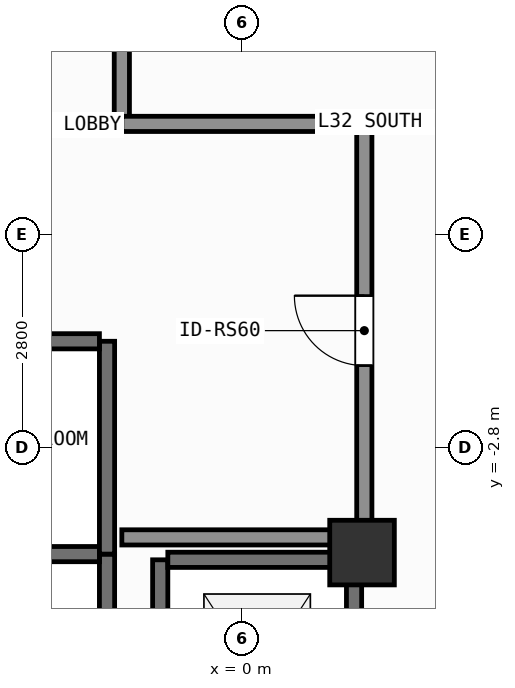
"""IFC4 building model, lengths in metres.
Left out: names, types, materials, properties, quantities, classifications, styles, units other than length and angle.
Written with IfcOpenShell. Run it as: python <this file> out.ifc"""

import sys

from ifc_helpers import new_model, si_unit, direction, frame, frame_2d, origin, origin_2d, place, context, subcontext, project, spatial, rectangle, extrude, element, fill, save


model = new_model("IFC4")
c1 = context("Model", 3, precision=1e-05, world=origin(), true_north=direction((0.0, 1.0)))
c2 = subcontext(c1, "Body", "Model", "MODEL_VIEW")
j1 = project(units=[si_unit("LENGTHUNIT", "METRE"), si_unit("PLANEANGLEUNIT", "RADIAN")], contexts=[c1])
p1 = place(None, origin())
s1 = spatial("IfcSite", under=j1, at=p1, CompositionType="ELEMENT")
p2 = place(p1, origin())
s2 = spatial("IfcBuilding", under=s1, at=p2, CompositionType="ELEMENT")
p3 = place(p2, frame((0.0, 0.0, 129.0)))
s3 = spatial("IfcBuildingStorey", under=s2, at=p3, CompositionType="ELEMENT", Elevation=129.0)
p4 = place(p3, frame((1.58, -4.18, 0.0), z_axis=(0.0, 0.0, 1.0), x_axis=(1.0, 0.0, 0.0)))
e1 = element("IfcColumn", 1, at=p4, inside=s3, PredefinedType="COLUMN", context=c2, shape_type="SweptSolid", body=[
    extrude(rectangle(XDim=0.85, YDim=0.85, at=origin_2d()), origin(), (0.0, 0.0, 1.0), 3.9),
])
p5 = place(p3, frame((-1.775, -7.0, 0.0), z_axis=(0.0, 0.0, 1.0), x_axis=(0.0, 1.0, 0.0)))
e2 = element("IfcWall", 2, at=p5, inside=s3, PredefinedType="SHEAR", context=c2, shape_type="SweptSolid", body=[
    extrude(rectangle(XDim=2.8, YDim=0.2, at=frame_2d((1.4, 0.0))), origin(), (0.0, 0.0, 1.0), 3.68),
])
p6 = place(p3, frame((-4.325, -4.2, 0.0), z_axis=(0.0, 0.0, 1.0), x_axis=(1.0, 0.0, 0.0)))
e3 = element("IfcWall", 3, at=p6, inside=s3, PredefinedType="SHEAR", context=c2, shape_type="SweptSolid", body=[
    extrude(rectangle(XDim=2.45, YDim=0.2, at=frame_2d((1.225, 0.0))), origin(), (0.0, 0.0, 1.0), 3.68),
])
p7 = place(p3, frame((-1.775, -4.2, 0.0), z_axis=(0.0, 0.0, 1.0), x_axis=(0.0, 1.0, 0.0)))
e4 = element("IfcWall", 4, at=p7, inside=s3, PredefinedType="SHEAR", context=c2, shape_type="SweptSolid", body=[
    extrude(rectangle(XDim=2.8, YDim=0.2, at=frame_2d((1.4, 0.0))), origin(), (0.0, 0.0, 1.0), 3.68),
])
p8 = place(p3, frame((-4.325, -1.4, 0.0), z_axis=(0.0, 0.0, 1.0), x_axis=(1.0, 0.0, 0.0)))
e5 = element("IfcWall", 5, at=p8, inside=s3, PredefinedType="SHEAR", context=c2, shape_type="SweptSolid", body=[
    extrude(rectangle(XDim=2.45, YDim=0.2, at=frame_2d((1.225, 0.0))), origin(), (0.0, 0.0, 1.0), 3.68),
])
p9 = place(p3, frame((-1.075, -7.925, 0.0), z_axis=(0.0, 0.0, 1.0), x_axis=(0.0, 1.0, 0.0)))
e6 = element("IfcWall", 6, at=p9, inside=s3, PredefinedType="SHEAR", context=c2, shape_type="SweptSolid", body=[
    extrude(rectangle(XDim=3.65, YDim=0.2, at=frame_2d((1.825, 0.0))), origin(), (0.0, 0.0, 1.0), 3.68),
])
p10 = place(p3, frame((1.475, -7.925, 0.0), z_axis=(0.0, 0.0, 1.0), x_axis=(0.0, 1.0, 0.0)))
e7 = element("IfcWall", 7, at=p10, inside=s3, PredefinedType="SHEAR", context=c2, shape_type="SweptSolid", body=[
    extrude(rectangle(XDim=3.65, YDim=0.2, at=frame_2d((1.825, 0.0))), origin(), (0.0, 0.0, 1.0), 3.68),
])
p11 = place(p10, frame((1.575, 0.0, 0.0)))
e8 = element("IfcOpeningElement", 8, at=p11, cuts=e7, PredefinedType="OPENING", context=c2, shape_type="SweptSolid", body=[
    extrude(rectangle(XDim=1.1, YDim=2.2, at=frame_2d((0.55, 1.1))), frame((0.0, 0.11, 0.0), z_axis=(0.0, -1.0, 0.0), x_axis=(1.0, 0.0, 0.0)), (0.0, 0.0, 1.0), 0.22),
])
p12 = place(p3, frame((-0.975, -4.275, 0.0), z_axis=(0.0, 0.0, 1.0), x_axis=(1.0, 0.0, 0.0)))
e9 = element("IfcWall", 9, at=p12, inside=s3, PredefinedType="SHEAR", context=c2, shape_type="SweptSolid", body=[
    extrude(rectangle(XDim=2.35, YDim=0.2, at=frame_2d((1.175, 0.0))), origin(), (0.0, 0.0, 1.0), 3.68),
])
p13 = place(p3, frame((1.61, -3.98, 0.0), z_axis=(0.0, 0.0, 1.0), x_axis=(0.0, 1.0, 0.0)))
e10 = element("IfcWall", 10, at=p13, inside=s3, PredefinedType="SOLIDWALL", context=c2, shape_type="SweptSolid", body=[
    extrude(rectangle(XDim=5.44, YDim=0.2, at=frame_2d((2.72, 0.0))), origin(), (0.0, 0.0, 1.0), 3.68),
])
p14 = place(p13, frame((2.26, 0.0, 0.0)))
e11 = element("IfcOpeningElement", 11, at=p14, cuts=e10, PredefinedType="OPENING", context=c2, shape_type="SweptSolid", body=[
    extrude(rectangle(XDim=0.92, YDim=2.1, at=frame_2d((0.46, 1.05))), frame((0.0, 0.11, 0.0), z_axis=(0.0, -1.0, 0.0), x_axis=(1.0, 0.0, 0.0)), (0.0, 0.0, 1.0), 0.22),
])
p15 = place(p3, frame((-1.58, 1.48, 0.0), z_axis=(0.0, 0.0, 1.0), x_axis=(0.0, 1.0, 0.0)))
e12 = element("IfcWall", 12, at=p15, inside=s3, PredefinedType="SOLIDWALL", context=c2, shape_type="SweptSolid", body=[
    extrude(rectangle(XDim=2.7, YDim=0.2, at=frame_2d((1.35, 0.0))), origin(), (0.0, 0.0, 1.0), 3.68),
])
for number, where, z_axis, x_axis in (
    (13, (-1.58, -3.98, 0.0), (0.0, 0.0, 1.0), (1.0, 0.0, 0.0)),
    (14, (-1.58, 1.46, 0.0), (0.0, 0.0, 1.0), (1.0, 0.0, 0.0)),
):
    element("IfcWall", number, at=place(p3, frame(where, z_axis=z_axis, x_axis=x_axis)), inside=s3, PredefinedType="SOLIDWALL", context=c2, shape_type="SweptSolid", body=[
        extrude(rectangle(XDim=3.19, YDim=0.2, at=frame_2d((1.595, 0.0))), origin(), (0.0, 0.0, 1.0), 3.68),
    ])
p16 = place(p14, origin())
e15 = element("IfcDoor", 15, at=p16, inside=s3, OperationType="SINGLE_SWING_RIGHT", PredefinedType="DOOR", context=c2, shape_type="SweptSolid", body=[
    extrude(rectangle(XDim=0.92, YDim=2.1, at=frame_2d((0.46, 1.05))), frame((0.0, 0.025, 0.0), z_axis=(0.0, -1.0, 0.0), x_axis=(1.0, 0.0, 0.0)), (0.0, 0.0, 1.0), 0.05),
])
fill(e11, e15)
save(model, sys.argv[1])
